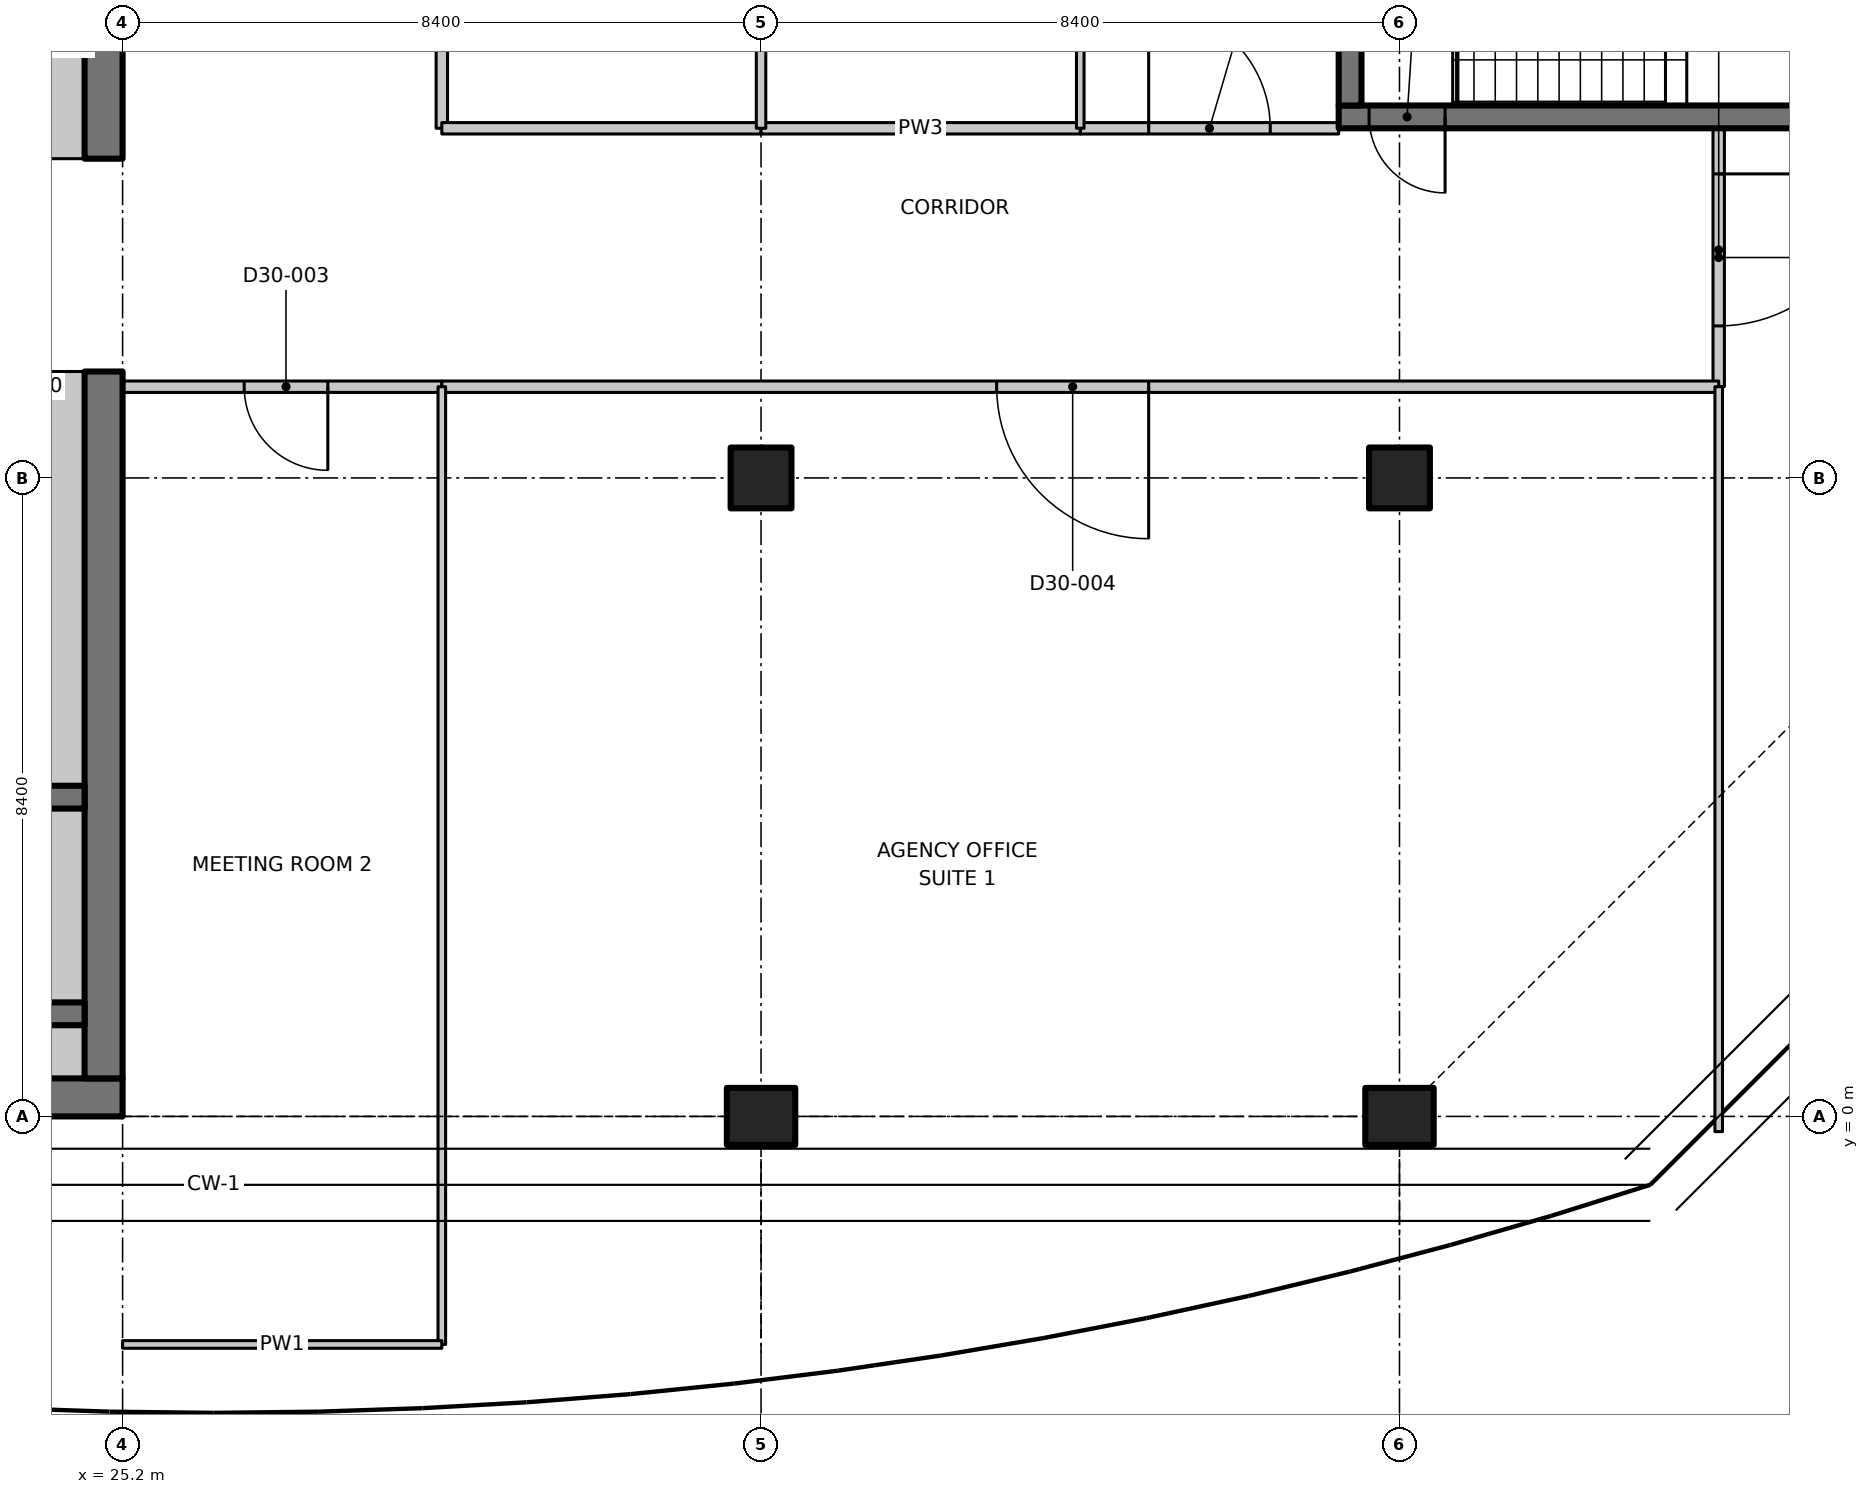
"""IFC4 building model, lengths in metres.
Left out: names, types, materials, properties, quantities, classifications, styles, units other than length and angle.
Written with IfcOpenShell. Run it as: python <this file> out.ifc"""

import sys

from ifc_helpers import new_model, si_unit, direction, frame, frame_2d, origin, origin_2d, place, context, subcontext, project, spatial, polyline, rectangle, outline, extrude, element, fill, save


model = new_model("IFC4")
c1 = context("Model", 3, precision=1e-05, world=origin(), true_north=direction((0.0, 1.0)))
c2 = subcontext(c1, "Body", "Model", "MODEL_VIEW")
j1 = project(units=[si_unit("LENGTHUNIT", "METRE"), si_unit("PLANEANGLEUNIT", "RADIAN")], contexts=[c1])
p1 = place(None, origin())
s1 = spatial("IfcSite", under=j1, at=p1, CompositionType="ELEMENT")
p2 = place(p1, origin())
s2 = spatial("IfcBuilding", under=s1, at=p2, CompositionType="ELEMENT")
p3 = place(p2, frame((0.0, 0.0, 240.9)))
s3 = spatial("IfcBuildingStorey", under=s2, at=p3, CompositionType="ELEMENT", Elevation=240.9)
p4 = place(p3, frame((33.6, 0.0, 0.0), z_axis=(0.0, 0.0, 1.0), x_axis=(0.0, 1.0, 0.0)))
e1 = element("IfcColumn", 1, at=p4, inside=s3, PredefinedType="COLUMN", context=c2, shape_type="SweptSolid", body=[
    extrude(rectangle(XDim=0.75, YDim=0.9, at=origin_2d()), origin(), (0.0, 0.0, 1.0), 3.35),
])
p5 = place(p3, frame((33.6, 8.4, 0.0), z_axis=(0.0, 0.0, 1.0), x_axis=(1.0, 0.0, 0.0)))
e2 = element("IfcColumn", 2, at=p5, inside=s3, PredefinedType="COLUMN", context=c2, shape_type="SweptSolid", body=[
    extrude(rectangle(XDim=0.8, YDim=0.8, at=origin_2d()), origin(), (0.0, 0.0, 1.0), 3.35),
])
p6 = place(p3, frame((42.0, 0.0, 0.0), z_axis=(0.0, 0.0, 1.0), x_axis=(0.0, 1.0, 0.0)))
e3 = element("IfcColumn", 3, at=p6, inside=s3, PredefinedType="COLUMN", context=c2, shape_type="SweptSolid", body=[
    extrude(rectangle(XDim=0.75, YDim=0.9, at=origin_2d()), origin(), (0.0, 0.0, 1.0), 3.35),
])
p7 = place(p3, frame((42.0, 8.4, 0.0), z_axis=(0.0, 0.0, 1.0), x_axis=(1.0, 0.0, 0.0)))
e4 = element("IfcColumn", 4, at=p7, inside=s3, PredefinedType="COLUMN", context=c2, shape_type="SweptSolid", body=[
    extrude(rectangle(XDim=0.8, YDim=0.8, at=origin_2d()), origin(), (0.0, 0.0, 1.0), 3.35),
])
p8 = place(p3, frame((7.436, 0.25, 0.0), z_axis=(0.0, 0.0, 1.0), x_axis=(1.0, 0.0, 0.0)))
e5 = element("IfcWall", 5, at=p8, inside=s3, PredefinedType="SHEAR", context=c2, shape_type="SweptSolid", body=[
    extrude(rectangle(XDim=17.764, YDim=0.5, at=frame_2d((8.882, 0.0))), origin(), (0.0, 0.0, 1.0), 3.35),
])
p9 = place(p3, frame((24.95, 0.5, 0.0), z_axis=(0.0, 0.0, 1.0), x_axis=(0.0, 1.0, 0.0)))
e6 = element("IfcWall", 6, at=p9, inside=s3, PredefinedType="SHEAR", context=c2, shape_type="SweptSolid", body=[
    extrude(rectangle(XDim=9.3, YDim=0.5, at=frame_2d((4.65, 0.0))), origin(), (0.0, 0.0, 1.0), 3.35),
])
p10 = place(p3, frame((24.95, 12.6, 0.0), z_axis=(0.0, 0.0, 1.0), x_axis=(0.0, 1.0, 0.0)))
e7 = element("IfcWall", 7, at=p10, inside=s3, PredefinedType="SHEAR", context=c2, shape_type="SweptSolid", body=[
    extrude(rectangle(XDim=3.7, YDim=0.5, at=frame_2d((1.85, 0.0))), origin(), (0.0, 0.0, 1.0), 3.35),
])
p11 = place(p3, frame((24.35, 12.6, 0.0), z_axis=(0.0, 0.0, 1.0), x_axis=(0.0, 1.0, 0.0)))
e8 = element("IfcWall", 8, at=p11, inside=s3, PredefinedType="PARTITIONING", context=c2, shape_type="SweptSolid", body=[
    extrude(rectangle(XDim=3.0, YDim=0.7, at=frame_2d((1.5, 0.0))), origin(), (0.0, 0.0, 1.0), 3.35),
])
p12 = place(p3, frame((15.8, 1.35, 0.0), z_axis=(0.0, 0.0, 1.0), x_axis=(1.0, 0.0, 0.0)))
e9 = element("IfcWall", 9, at=p12, inside=s3, PredefinedType="SHEAR", context=c2, shape_type="SweptSolid", body=[
    extrude(rectangle(XDim=8.9, YDim=0.3, at=frame_2d((4.45, 0.0))), origin(), (0.0, 0.0, 1.0), 3.35),
])
p13 = place(p3, frame((15.8, 4.2, 0.0), z_axis=(0.0, 0.0, 1.0), x_axis=(1.0, 0.0, 0.0)))
e10 = element("IfcWall", 10, at=p13, inside=s3, PredefinedType="SHEAR", context=c2, shape_type="SweptSolid", body=[
    extrude(rectangle(XDim=8.9, YDim=0.3, at=frame_2d((4.45, 0.0))), origin(), (0.0, 0.0, 1.0), 3.35),
])
p14 = place(p13, frame((0.4, 0.0, 0.0)))
e11 = element("IfcOpeningElement", 11, at=p14, cuts=e10, PredefinedType="OPENING", context=c2, shape_type="SweptSolid", body=[
    extrude(rectangle(XDim=1.0, YDim=2.1, at=frame_2d((0.5, 1.05))), frame((0.0, 0.16, 0.0), z_axis=(0.0, -1.0, 0.0), x_axis=(1.0, 0.0, 0.0)), (0.0, 0.0, 1.0), 0.32),
])
p15 = place(p3, frame((49.4, 13.15, 0.0), z_axis=(0.0, 0.0, 1.0), x_axis=(-1.0, 0.0, 0.0)))
e12 = element("IfcWall", 12, at=p15, inside=s3, PredefinedType="SHEAR", context=c2, shape_type="SweptSolid", body=[
    extrude(rectangle(XDim=8.2, YDim=0.3, at=frame_2d((4.1, 0.0))), origin(), (0.0, 0.0, 1.0), 3.35),
])
p16 = place(p15, frame((6.8, 0.0, 0.0)))
e13 = element("IfcOpeningElement", 13, at=p16, cuts=e12, PredefinedType="OPENING", context=c2, shape_type="SweptSolid", body=[
    extrude(rectangle(XDim=1.0, YDim=2.1, at=frame_2d((0.5, 1.05))), frame((0.0, 0.16, 0.0), z_axis=(0.0, -1.0, 0.0), x_axis=(1.0, 0.0, 0.0)), (0.0, 0.0, 1.0), 0.32),
])
p17 = place(p3, frame((41.35, 13.3, 0.0), z_axis=(0.0, 0.0, 1.0), x_axis=(0.0, 1.0, 0.0)))
e14 = element("IfcWall", 14, at=p17, inside=s3, PredefinedType="SHEAR", context=c2, shape_type="SweptSolid", body=[
    extrude(rectangle(XDim=2.55, YDim=0.3, at=frame_2d((1.275, 0.0))), origin(), (0.0, 0.0, 1.0), 3.35),
])
p18 = place(p3, frame((13.35, 0.85, 0.0), z_axis=(0.0, 0.0, 1.0), x_axis=(1.0, 0.0, 0.0)))
e15 = element("IfcWall", 15, at=p18, inside=s3, PredefinedType="PARTITIONING", context=c2, shape_type="SweptSolid", body=[
    extrude(rectangle(XDim=11.35, YDim=0.7, at=frame_2d((5.675, 0.0))), origin(), (0.0, 0.0, 1.0), 3.35),
])
p19 = place(p3, frame((24.35, 1.5, 0.0), z_axis=(0.0, 0.0, 1.0), x_axis=(0.0, 1.0, 0.0)))
e16 = element("IfcWall", 16, at=p19, inside=s3, PredefinedType="PARTITIONING", context=c2, shape_type="SweptSolid", body=[
    extrude(rectangle(XDim=2.55, YDim=0.7, at=frame_2d((1.275, 0.0))), origin(), (0.0, 0.0, 1.0), 3.35),
])
p20 = place(p3, frame((24.35, 4.35, 0.0), z_axis=(0.0, 0.0, 1.0), x_axis=(0.0, 1.0, 0.0)))
e17 = element("IfcWall", 17, at=p20, inside=s3, PredefinedType="PARTITIONING", context=c2, shape_type="SweptSolid", body=[
    extrude(rectangle(XDim=5.45, YDim=0.7, at=frame_2d((2.725, 0.0))), origin(), (0.0, 0.0, 1.0), 3.35),
])
p21 = place(p3, frame((29.4, 9.6, 0.0), z_axis=(0.0, 0.0, 1.0), x_axis=(-1.0, 0.0, 0.0)))
e18 = element("IfcWall", 18, at=p21, inside=s3, PredefinedType="PARTITIONING", context=c2, shape_type="SweptSolid", body=[
    extrude(rectangle(XDim=4.2, YDim=0.15, at=frame_2d((2.1, 0.0))), origin(), (0.0, 0.0, 1.0), 3.33),
])
p22 = place(p21, frame((1.5, 0.0, 0.0)))
e19 = element("IfcOpeningElement", 19, at=p22, cuts=e18, PredefinedType="OPENING", context=c2, shape_type="SweptSolid", body=[
    extrude(rectangle(XDim=1.1, YDim=2.1, at=frame_2d((0.55, 1.05))), frame((0.0, 0.085, 0.0), z_axis=(0.0, -1.0, 0.0), x_axis=(1.0, 0.0, 0.0)), (0.0, 0.0, 1.0), 0.17),
])
p23 = place(p3, frame((29.4, 21.2, 0.0), z_axis=(0.0, 0.0, 1.0), x_axis=(0.0, -1.0, 0.0)))
e20 = element("IfcWall", 20, at=p23, inside=s3, PredefinedType="PARTITIONING", context=c2, shape_type="SweptSolid", body=[
    extrude(rectangle(XDim=8.2, YDim=0.15, at=frame_2d((4.1, 0.0))), origin(), (0.0, 0.0, 1.0), 3.33),
])
p24 = place(p23, frame((3.3, 0.0, 0.0)))
e21 = element("IfcOpeningElement", 21, at=p24, cuts=e20, PredefinedType="OPENING", context=c2, shape_type="SweptSolid", body=[
    extrude(rectangle(XDim=1.6, YDim=2.1, at=frame_2d((0.8, 1.05))), frame((0.0, 0.085, 0.0), z_axis=(0.0, -1.0, 0.0), x_axis=(1.0, 0.0, 0.0)), (0.0, 0.0, 1.0), 0.17),
])
p25 = place(p3, frame((46.2, 13.0, 0.0), z_axis=(0.0, 0.0, 1.0), x_axis=(0.0, -1.0, 0.0)))
e22 = element("IfcWall", 22, at=p25, inside=s3, PredefinedType="PARTITIONING", context=c2, shape_type="SweptSolid", body=[
    extrude(rectangle(XDim=3.4, YDim=0.15, at=frame_2d((1.7, 0.0))), origin(), (0.0, 0.0, 1.0), 3.33),
])
p26 = place(p25, frame((0.6, 0.0, 0.0)))
e23 = element("IfcOpeningElement", 23, at=p26, cuts=e22, PredefinedType="OPENING", context=c2, shape_type="SweptSolid", body=[
    extrude(rectangle(XDim=2.0, YDim=2.4, at=frame_2d((1.0, 1.2))), frame((0.0, 0.085, 0.0), z_axis=(0.0, -1.0, 0.0), x_axis=(1.0, 0.0, 0.0)), (0.0, 0.0, 1.0), 0.17),
])
p27 = place(p3, frame((46.2, 9.6, 0.0), z_axis=(0.0, 0.0, 1.0), x_axis=(-1.0, 0.0, 0.0)))
e24 = element("IfcWall", 24, at=p27, inside=s3, PredefinedType="PARTITIONING", context=c2, shape_type="SweptSolid", body=[
    extrude(rectangle(XDim=16.8, YDim=0.15, at=frame_2d((8.4, 0.0))), origin(), (0.0, 0.0, 1.0), 3.33),
])
p28 = place(p27, frame((7.5, 0.0, 0.0)))
e25 = element("IfcOpeningElement", 25, at=p28, cuts=e24, PredefinedType="OPENING", context=c2, shape_type="SweptSolid", body=[
    extrude(rectangle(XDim=2.0, YDim=2.4, at=frame_2d((1.0, 1.2))), frame((0.0, 0.085, 0.0), z_axis=(0.0, -1.0, 0.0), x_axis=(1.0, 0.0, 0.0)), (0.0, 0.0, 1.0), 0.17),
])
p29 = place(p3, frame((29.4, 13.0, 0.0), z_axis=(0.0, 0.0, 1.0), x_axis=(1.0, 0.0, 0.0)))
e26 = element("IfcWall", 26, at=p29, inside=s3, PredefinedType="PARTITIONING", context=c2, shape_type="SweptSolid", body=[
    extrude(rectangle(XDim=4.2, YDim=0.15, at=frame_2d((2.1, 0.0))), origin(), (0.0, 0.0, 1.0), 3.33),
])
p30 = place(p3, frame((37.8, 13.0, 0.0), z_axis=(0.0, 0.0, 1.0), x_axis=(1.0, 0.0, 0.0)))
e27 = element("IfcWall", 27, at=p30, inside=s3, PredefinedType="PARTITIONING", context=c2, shape_type="SweptSolid", body=[
    extrude(rectangle(XDim=3.4, YDim=0.15, at=frame_2d((1.7, 0.0))), origin(), (0.0, 0.0, 1.0), 3.33),
])
p31 = place(p30, frame((0.9, 0.0, 0.0)))
e28 = element("IfcOpeningElement", 28, at=p31, cuts=e27, PredefinedType="OPENING", context=c2, shape_type="SweptSolid", body=[
    extrude(rectangle(XDim=1.6, YDim=2.1, at=frame_2d((0.8, 1.05))), frame((0.0, 0.085, 0.0), z_axis=(0.0, -1.0, 0.0), x_axis=(1.0, 0.0, 0.0)), (0.0, 0.0, 1.0), 0.17),
])
p32 = place(p3, frame((33.6, 13.0, 0.0), z_axis=(0.0, 0.0, 1.0), x_axis=(1.0, 0.0, 0.0)))
e29 = element("IfcWall", 29, at=p32, inside=s3, PredefinedType="PARTITIONING", context=c2, shape_type="SweptSolid", body=[
    extrude(rectangle(XDim=4.2, YDim=0.15, at=frame_2d((2.1, 0.0))), origin(), (0.0, 0.0, 1.0), 3.33),
])
p33 = place(p3, frame((46.2, -0.2, 0.0), z_axis=(0.0, 0.0, 1.0), x_axis=(0.0, 1.0, 0.0)))
e30 = element("IfcWall", 30, at=p33, inside=s3, PredefinedType="PARTITIONING", context=c2, shape_type="SweptSolid", body=[
    extrude(outline(polyline([(0.0, 0.0), (9.8, 0.0), (9.8, 3.33), (5.066, 3.33), (5.064, 2.98), (3.736, 2.98), (3.734, 3.33), (0.0, 3.33), (0.0, 0.0)])), frame((0.0, 0.05, 0.0), z_axis=(0.0, -1.0, 0.0), x_axis=(1.0, 0.0, 0.0)), (0.0, 0.0, 1.0), 0.1),
])
p34 = place(p3, frame((29.4, 9.6, 0.0), z_axis=(0.0, 0.0, 1.0), x_axis=(0.0, -1.0, 0.0)))
e31 = element("IfcWall", 31, at=p34, inside=s3, PredefinedType="PARTITIONING", context=c2, shape_type="SweptSolid", body=[
    extrude(outline(polyline([(0.0, 0.0), (12.6, 0.0), (12.6, 3.33), (10.05, 3.33), (10.048, 2.98), (9.152, 2.98), (9.15, 3.33), (0.0, 3.33), (0.0, 0.0)])), frame((0.0, 0.05, 0.0), z_axis=(0.0, -1.0, 0.0), x_axis=(1.0, 0.0, 0.0)), (0.0, 0.0, 1.0), 0.1),
])
p35 = place(p3, frame((29.4, -3.0, 0.0), z_axis=(0.0, 0.0, 1.0), x_axis=(-1.0, 0.0, 0.0)))
e32 = element("IfcWall", 32, at=p35, inside=s3, PredefinedType="PARTITIONING", context=c2, shape_type="SweptSolid", body=[
    extrude(rectangle(XDim=4.2, YDim=0.1, at=frame_2d((2.1, 0.0))), origin(), (0.0, 0.0, 1.0), 3.33),
])
p36 = place(p3, frame((33.6, 16.38, 0.0), z_axis=(0.0, 0.0, 1.0), x_axis=(0.0, -1.0, 0.0)))
e33 = element("IfcWall", 33, at=p36, inside=s3, PredefinedType="PARTITIONING", context=c2, shape_type="SweptSolid", body=[
    extrude(rectangle(XDim=3.38, YDim=0.125, at=frame_2d((1.69, 0.0))), origin(), (0.0, 0.0, 1.0), 3.33),
])
p37 = place(p3, frame((37.8, 13.0, 0.0), z_axis=(0.0, 0.0, 1.0), x_axis=(0.0, 1.0, 0.0)))
e34 = element("IfcWall", 34, at=p37, inside=s3, PredefinedType="PARTITIONING", context=c2, shape_type="SweptSolid", body=[
    extrude(rectangle(XDim=6.0, YDim=0.1, at=frame_2d((3.0, 0.0))), origin(), (0.0, 0.0, 1.0), 3.33),
])
p38 = place(p37, frame((2.4, 0.0, 0.0)))
e35 = element("IfcOpeningElement", 35, at=p38, cuts=e34, PredefinedType="OPENING", context=c2, shape_type="SweptSolid", body=[
    extrude(rectangle(XDim=1.0, YDim=2.1, at=frame_2d((0.5, 1.05))), frame((0.0, 0.06, 0.0), z_axis=(0.0, -1.0, 0.0), x_axis=(1.0, 0.0, 0.0)), (0.0, 0.0, 1.0), 0.12),
])
p39 = place(p16, origin())
e36 = element("IfcDoor", 36, at=p39, inside=s3, OperationType="SINGLE_SWING_RIGHT", PredefinedType="DOOR", context=c2, shape_type="SweptSolid", body=[
    extrude(rectangle(XDim=1.0, YDim=2.1, at=frame_2d((0.5, 1.05))), frame((0.0, 0.025, 0.0), z_axis=(0.0, -1.0, 0.0), x_axis=(1.0, 0.0, 0.0)), (0.0, 0.0, 1.0), 0.05),
])
fill(e13, e36)
p40 = place(p26, origin())
e37 = element("IfcDoor", 37, at=p40, inside=s3, OperationType="DOUBLE_DOOR_SINGLE_SWING", PredefinedType="DOOR", context=c2, shape_type="SweptSolid", body=[
    extrude(rectangle(XDim=2.0, YDim=2.4, at=frame_2d((1.0, 1.2))), frame((0.0, 0.025, 0.0), z_axis=(0.0, -1.0, 0.0), x_axis=(1.0, 0.0, 0.0)), (0.0, 0.0, 1.0), 0.05),
])
fill(e23, e37)
p41 = place(p22, origin())
e38 = element("IfcDoor", 38, at=p41, inside=s3, OperationType="SINGLE_SWING_LEFT", PredefinedType="DOOR", context=c2, shape_type="SweptSolid", body=[
    extrude(rectangle(XDim=1.1, YDim=2.1, at=frame_2d((0.55, 1.05))), frame((0.0, 0.025, 0.0), z_axis=(0.0, -1.0, 0.0), x_axis=(1.0, 0.0, 0.0)), (0.0, 0.0, 1.0), 0.05),
])
fill(e19, e38)
p42 = place(p28, origin())
e39 = element("IfcDoor", 39, at=p42, inside=s3, OperationType="DOUBLE_DOOR_SINGLE_SWING", PredefinedType="DOOR", context=c2, shape_type="SweptSolid", body=[
    extrude(rectangle(XDim=2.0, YDim=2.4, at=frame_2d((1.0, 1.2))), frame((0.0, 0.025, 0.0), z_axis=(0.0, -1.0, 0.0), x_axis=(1.0, 0.0, 0.0)), (0.0, 0.0, 1.0), 0.05),
])
fill(e25, e39)
p43 = place(p31, origin())
e40 = element("IfcDoor", 40, at=p43, inside=s3, OperationType="DOUBLE_DOOR_SINGLE_SWING", PredefinedType="DOOR", context=c2, shape_type="SweptSolid", body=[
    extrude(rectangle(XDim=1.6, YDim=2.1, at=frame_2d((0.8, 1.05))), frame((0.0, 0.025, 0.0), z_axis=(0.0, -1.0, 0.0), x_axis=(1.0, 0.0, 0.0)), (0.0, 0.0, 1.0), 0.05),
])
fill(e28, e40)
save(model, sys.argv[1])
